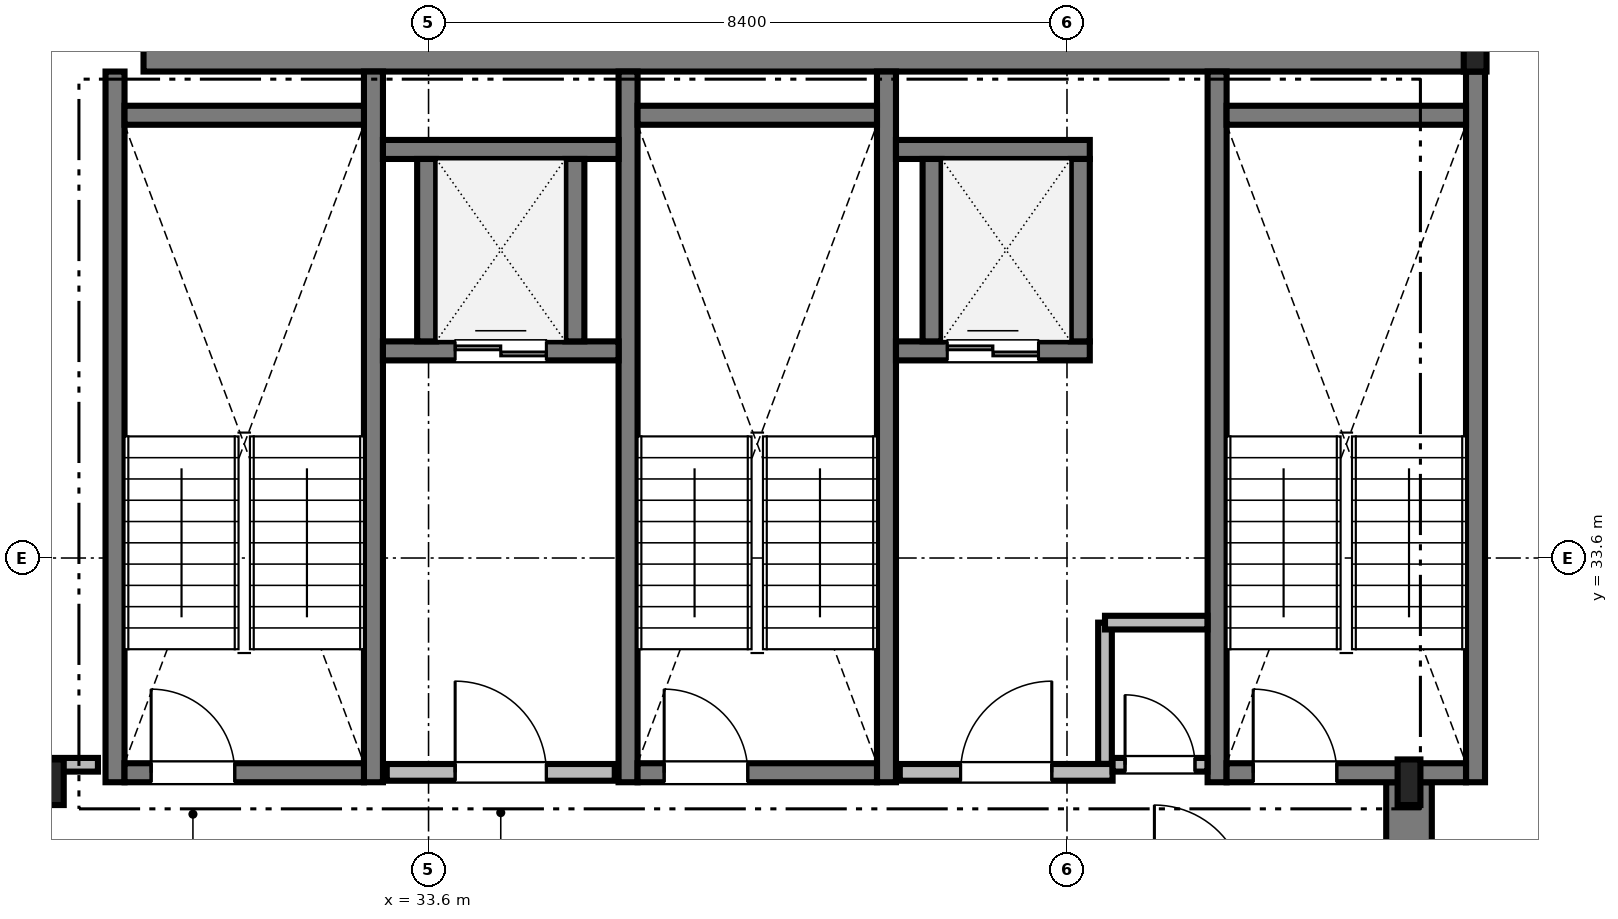
"""IFC4 building model, lengths in metres.
Left out: names, types, materials, properties, quantities, classifications, styles, units other than length and angle.
Written with IfcOpenShell. Run it as: python <this file> out.ifc"""

import sys

from ifc_helpers import new_model, si_unit, direction, frame, frame_2d, origin, origin_2d, place, context, subcontext, project, spatial, rectangle, i_section, extrude, source, transform, mapped, element, fill, save


model = new_model("IFC4")
c1 = context("Model", 3, precision=1e-05, world=origin(), true_north=direction((0.0, 1.0)))
c2 = subcontext(c1, "Body", "Model", "MODEL_VIEW")
j1 = project(units=[si_unit("LENGTHUNIT", "METRE"), si_unit("PLANEANGLEUNIT", "RADIAN")], contexts=[c1])
p1 = place(None, origin())
s1 = spatial("IfcSite", under=j1, at=p1, CompositionType="ELEMENT")
p2 = place(p1, origin())
s2 = spatial("IfcBuilding", under=s1, at=p2, CompositionType="ELEMENT")
p3 = place(p2, frame((0.0, 0.0, 266.4)))
s3 = spatial("IfcBuildingStorey", under=s2, at=p3, CompositionType="ELEMENT", Elevation=266.4)
m1 = source(origin(), c2, "Body", "SweptSolid", [
    extrude(rectangle(XDim=17.52, YDim=0.6, at=frame_2d((8.76, 0.0))), origin(), (0.0, 0.0, 1.0), 3.65),
])
p4 = place(p3, frame((29.85, 40.3, 0.0), z_axis=(0.0, 0.0, 1.0), x_axis=(1.0, 0.0, 0.0)))
e1 = element("IfcWall", 1, at=p4, inside=s3, PredefinedType="SHEAR", context=c2, shape_type="MappedRepresentation", body=[
    mapped(m1, transform((0.0, 0.0, 0.0), scale=1.0)),
])
m2 = source(origin(), c2, "Body", "SweptSolid", [
    extrude(rectangle(XDim=13.15, YDim=0.6, at=frame_2d((6.575, 0.0))), origin(), (0.0, 0.0, 1.0), 3.65),
])
p5 = place(p3, frame((46.5, 17.5, 0.0), z_axis=(0.0, 0.0, 1.0), x_axis=(0.0, 1.0, 0.0)))
e2 = element("IfcWall", 2, at=p5, inside=s3, PredefinedType="SHEAR", context=c2, shape_type="MappedRepresentation", body=[
    mapped(m2, transform((0.0, 0.0, 0.0), scale=1.0)),
])
m3 = source(origin(), c2, "Body", "SweptSolid", [
    extrude(i_section(OverallWidth=0.3, OverallDepth=0.6, WebThickness=0.015, FlangeThickness=0.03, FilletRadius=0.027, at=origin_2d()), origin(), (0.0, 0.0, 1.0), 3.65),
])
for number, where, z_axis, x_axis in (
    (3, (28.65, 30.65, 0.0), (0.0, 0.0, 1.0), (1.0, 0.0, 0.0)),
    (4, (46.5, 30.65, 0.0), (0.0, 0.0, 1.0), (1.0, 0.0, 0.0)),
    (5, (47.37, 40.3, 0.0), (0.0, 0.0, 1.0), (1.0, 0.0, 0.0)),
):
    element("IfcColumn", number, at=place(p3, frame(where, z_axis=z_axis, x_axis=x_axis)), inside=s3, PredefinedType="COLUMN", context=c2, shape_type="MappedRepresentation", body=[
        mapped(m3, transform((0.0, 0.0, 0.0), scale=1.0)),
    ])
m4 = source(origin(), c2, "Body", "SweptSolid", [
    extrude(rectangle(XDim=9.35, YDim=0.25, at=frame_2d((4.675, 0.0))), origin(), (0.0, 0.0, 1.0), 3.75),
])
for number, where, z_axis, x_axis in (
    (6, (29.475, 30.65, 0.0), (0.0, 0.0, 1.0), (0.0, 1.0, 0.0)),
    (7, (32.875, 30.65, 0.0), (0.0, 0.0, 1.0), (0.0, 1.0, 0.0)),
):
    element("IfcWall", number, at=place(p3, frame(where, z_axis=z_axis, x_axis=x_axis)), inside=s3, PredefinedType="SOLIDWALL", context=c2, shape_type="MappedRepresentation", body=[
        mapped(m4, transform((0.0, 0.0, 0.0), scale=1.0)),
    ])
m5 = source(origin(), c2, "Body", "SweptSolid", [
    extrude(rectangle(XDim=3.15, YDim=0.25, at=frame_2d((1.575, 0.0))), origin(), (0.0, 0.0, 1.0), 3.75),
])
p6 = place(p3, frame((29.6, 39.425, 0.0), z_axis=(0.0, 0.0, 1.0), x_axis=(1.0, 0.0, 0.0)))
e8 = element("IfcWall", 8, at=p6, inside=s3, PredefinedType="SOLIDWALL", context=c2, shape_type="MappedRepresentation", body=[
    mapped(m5, transform((0.0, 0.0, 0.0), scale=1.0)),
])
p7 = place(p3, frame((29.6, 30.775, 0.0), z_axis=(0.0, 0.0, 1.0), x_axis=(1.0, 0.0, 0.0)))
e9 = element("IfcWall", 9, at=p7, inside=s3, PredefinedType="SOLIDWALL", context=c2, shape_type="MappedRepresentation", body=[
    mapped(m5, transform((0.0, 0.0, 0.0), scale=1.0)),
])
m6 = source(origin(), c2, "Body", "SweptSolid", [
    extrude(rectangle(XDim=1.1, YDim=2.2, at=frame_2d((0.55, 1.1))), frame((0.0, 0.135, 0.0), z_axis=(0.0, -1.0, 0.0), x_axis=(1.0, 0.0, 0.0)), (0.0, 0.0, 1.0), 0.27),
])
p8 = place(p7, frame((0.35, 0.0, 0.0)))
e10 = element("IfcOpeningElement", 10, at=p8, cuts=e9, PredefinedType="OPENING", context=c2, shape_type="MappedRepresentation", body=[
    mapped(m6, transform((0.0, 0.0, 0.0), scale=1.0)),
])
for number, where, z_axis, x_axis in (
    (11, (36.225, 30.65, 0.0), (0.0, 0.0, 1.0), (0.0, 1.0, 0.0)),
    (12, (39.625, 30.65, 0.0), (0.0, 0.0, 1.0), (0.0, 1.0, 0.0)),
):
    element("IfcWall", number, at=place(p3, frame(where, z_axis=z_axis, x_axis=x_axis)), inside=s3, PredefinedType="SOLIDWALL", context=c2, shape_type="MappedRepresentation", body=[
        mapped(m4, transform((0.0, 0.0, 0.0), scale=1.0)),
    ])
p9 = place(p3, frame((36.35, 39.425, 0.0), z_axis=(0.0, 0.0, 1.0), x_axis=(1.0, 0.0, 0.0)))
e13 = element("IfcWall", 13, at=p9, inside=s3, PredefinedType="SOLIDWALL", context=c2, shape_type="MappedRepresentation", body=[
    mapped(m5, transform((0.0, 0.0, 0.0), scale=1.0)),
])
p10 = place(p3, frame((36.35, 30.775, 0.0), z_axis=(0.0, 0.0, 1.0), x_axis=(1.0, 0.0, 0.0)))
e14 = element("IfcWall", 14, at=p10, inside=s3, PredefinedType="SOLIDWALL", context=c2, shape_type="MappedRepresentation", body=[
    mapped(m5, transform((0.0, 0.0, 0.0), scale=1.0)),
])
p11 = place(p10, frame((0.35, 0.0, 0.0)))
e15 = element("IfcOpeningElement", 15, at=p11, cuts=e14, PredefinedType="OPENING", context=c2, shape_type="MappedRepresentation", body=[
    mapped(m6, transform((0.0, 0.0, 0.0), scale=1.0)),
])
for number, where, z_axis, x_axis in (
    (16, (43.975, 30.65, 0.0), (0.0, 0.0, 1.0), (0.0, 1.0, 0.0)),
    (17, (47.375, 30.65, 0.0), (0.0, 0.0, 1.0), (0.0, 1.0, 0.0)),
):
    element("IfcWall", number, at=place(p3, frame(where, z_axis=z_axis, x_axis=x_axis)), inside=s3, PredefinedType="SOLIDWALL", context=c2, shape_type="MappedRepresentation", body=[
        mapped(m4, transform((0.0, 0.0, 0.0), scale=1.0)),
    ])
p12 = place(p3, frame((44.1, 39.425, 0.0), z_axis=(0.0, 0.0, 1.0), x_axis=(1.0, 0.0, 0.0)))
e18 = element("IfcWall", 18, at=p12, inside=s3, PredefinedType="SOLIDWALL", context=c2, shape_type="MappedRepresentation", body=[
    mapped(m5, transform((0.0, 0.0, 0.0), scale=1.0)),
])
p13 = place(p3, frame((44.1, 30.775, 0.0), z_axis=(0.0, 0.0, 1.0), x_axis=(1.0, 0.0, 0.0)))
e19 = element("IfcWall", 19, at=p13, inside=s3, PredefinedType="SOLIDWALL", context=c2, shape_type="MappedRepresentation", body=[
    mapped(m5, transform((0.0, 0.0, 0.0), scale=1.0)),
])
p14 = place(p13, frame((0.35, 0.0, 0.0)))
e20 = element("IfcOpeningElement", 20, at=p14, cuts=e19, PredefinedType="OPENING", context=c2, shape_type="MappedRepresentation", body=[
    mapped(m6, transform((0.0, 0.0, 0.0), scale=1.0)),
])
m7 = source(origin(), c2, "Body", "SweptSolid", [
    extrude(rectangle(XDim=3.0, YDim=0.22, at=frame_2d((1.5, 0.0))), origin(), (0.0, 0.0, 1.0), 3.65),
])
p15 = place(p3, frame((33.05, 30.78, 0.0), z_axis=(0.0, 0.0, 1.0), x_axis=(1.0, 0.0, 0.0)))
e21 = element("IfcWall", 21, at=p15, inside=s3, PredefinedType="SOLIDWALL", context=c2, shape_type="MappedRepresentation", body=[
    mapped(m7, transform((0.0, 0.0, 0.0), scale=1.0)),
])
m8 = source(origin(), c2, "Body", "SweptSolid", [
    extrude(rectangle(XDim=1.2, YDim=2.2, at=frame_2d((0.6, 1.1))), frame((0.0, 0.12, 0.0), z_axis=(0.0, -1.0, 0.0), x_axis=(1.0, 0.0, 0.0)), (0.0, 0.0, 1.0), 0.24),
])
p16 = place(p15, frame((0.9, 0.0, 0.0)))
e22 = element("IfcOpeningElement", 22, at=p16, cuts=e21, PredefinedType="OPENING", context=c2, shape_type="MappedRepresentation", body=[
    mapped(m8, transform((0.0, 0.0, 0.0), scale=1.0)),
])
m9 = source(origin(), c2, "Body", "SweptSolid", [
    extrude(rectangle(XDim=2.8, YDim=0.22, at=frame_2d((1.4, 0.0))), origin(), (0.0, 0.0, 1.0), 3.65),
])
p17 = place(p3, frame((39.8, 30.78, 0.0), z_axis=(0.0, 0.0, 1.0), x_axis=(1.0, 0.0, 0.0)))
e23 = element("IfcWall", 23, at=p17, inside=s3, PredefinedType="SOLIDWALL", context=c2, shape_type="MappedRepresentation", body=[
    mapped(m9, transform((0.0, 0.0, 0.0), scale=1.0)),
])
p18 = place(p17, frame((0.8, 0.0, 0.0)))
e24 = element("IfcOpeningElement", 24, at=p18, cuts=e23, PredefinedType="OPENING", context=c2, shape_type="MappedRepresentation", body=[
    mapped(m8, transform((0.0, 0.0, 0.0), scale=1.0)),
])
m10 = source(origin(), c2, "Body", "SweptSolid", [
    extrude(rectangle(XDim=3.1, YDim=0.25, at=frame_2d((1.55, 0.0))), origin(), (0.0, 0.0, 1.0), 3.65),
])
p19 = place(p3, frame((33.0, 36.325, 0.0), z_axis=(0.0, 0.0, 1.0), x_axis=(1.0, 0.0, 0.0)))
e25 = element("IfcWall", 25, at=p19, inside=s3, PredefinedType="SOLIDWALL", context=c2, shape_type="MappedRepresentation", body=[
    mapped(m10, transform((0.0, 0.0, 0.0), scale=1.0)),
])
m11 = source(origin(), c2, "Body", "SweptSolid", [
    extrude(rectangle(XDim=1.2, YDim=2.25, at=frame_2d((0.6, 1.125))), frame((0.0, 0.135, 0.0), z_axis=(0.0, -1.0, 0.0), x_axis=(1.0, 0.0, 0.0)), (0.0, 0.0, 1.0), 0.27),
])
p20 = place(p19, frame((0.95, 0.0, 0.0)))
e26 = element("IfcOpeningElement", 26, at=p20, cuts=e25, PredefinedType="OPENING", context=c2, shape_type="MappedRepresentation", body=[
    mapped(m11, transform((0.0, 0.0, 0.0), scale=1.0)),
])
p21 = place(p3, frame((33.0, 38.975, 0.0), z_axis=(0.0, 0.0, 1.0), x_axis=(1.0, 0.0, 0.0)))
e27 = element("IfcWall", 27, at=p21, inside=s3, PredefinedType="SOLIDWALL", context=c2, shape_type="MappedRepresentation", body=[
    mapped(m10, transform((0.0, 0.0, 0.0), scale=1.0)),
])
m12 = source(origin(), c2, "Body", "SweptSolid", [
    extrude(rectangle(XDim=2.4, YDim=0.25, at=frame_2d((1.2, 0.0))), origin(), (0.0, 0.0, 1.0), 3.65),
])
for number, where, z_axis, x_axis in (
    (28, (33.575, 36.45, 0.0), (0.0, 0.0, 1.0), (0.0, 1.0, 0.0)),
    (29, (35.525, 36.45, 0.0), (0.0, 0.0, 1.0), (0.0, 1.0, 0.0)),
):
    element("IfcWall", number, at=place(p3, frame(where, z_axis=z_axis, x_axis=x_axis)), inside=s3, PredefinedType="SOLIDWALL", context=c2, shape_type="MappedRepresentation", body=[
        mapped(m12, transform((0.0, 0.0, 0.0), scale=1.0)),
    ])
m13 = source(origin(), c2, "Body", "SweptSolid", [
    extrude(rectangle(XDim=2.55, YDim=0.25, at=frame_2d((1.275, 0.0))), origin(), (0.0, 0.0, 1.0), 3.65),
])
p22 = place(p3, frame((39.75, 36.325, 0.0), z_axis=(0.0, 0.0, 1.0), x_axis=(1.0, 0.0, 0.0)))
e30 = element("IfcWall", 30, at=p22, inside=s3, PredefinedType="SOLIDWALL", context=c2, shape_type="MappedRepresentation", body=[
    mapped(m13, transform((0.0, 0.0, 0.0), scale=1.0)),
])
p23 = place(p22, frame((0.675, 0.0, 0.0)))
e31 = element("IfcOpeningElement", 31, at=p23, cuts=e30, PredefinedType="OPENING", context=c2, shape_type="MappedRepresentation", body=[
    mapped(m11, transform((0.0, 0.0, 0.0), scale=1.0)),
])
p24 = place(p3, frame((39.75, 38.975, 0.0), z_axis=(0.0, 0.0, 1.0), x_axis=(1.0, 0.0, 0.0)))
e32 = element("IfcWall", 32, at=p24, inside=s3, PredefinedType="SOLIDWALL", context=c2, shape_type="MappedRepresentation", body=[
    mapped(m13, transform((0.0, 0.0, 0.0), scale=1.0)),
])
for number, where, z_axis, x_axis in (
    (33, (40.225, 36.45, 0.0), (0.0, 0.0, 1.0), (0.0, 1.0, 0.0)),
    (34, (42.175, 36.45, 0.0), (0.0, 0.0, 1.0), (0.0, 1.0, 0.0)),
):
    element("IfcWall", number, at=place(p3, frame(where, z_axis=z_axis, x_axis=x_axis)), inside=s3, PredefinedType="SOLIDWALL", context=c2, shape_type="MappedRepresentation", body=[
        mapped(m12, transform((0.0, 0.0, 0.0), scale=1.0)),
    ])
m14 = source(origin(), c2, "Body", "SweptSolid", [
    extrude(rectangle(XDim=11.708, YDim=0.18, at=frame_2d((5.854, 0.0))), origin(), (0.0, 0.0, 1.0), 2.892),
])
p25 = place(p3, frame((17.542, 30.88, 0.0), z_axis=(0.0, 0.0, 1.0), x_axis=(1.0, 0.0, 0.0)))
e35 = element("IfcWall", 35, at=p25, inside=s3, PredefinedType="PARTITIONING", context=c2, shape_type="MappedRepresentation", body=[
    mapped(m14, transform((0.0, 0.0, 0.0), scale=1.0)),
])
m15 = source(origin(), c2, "Body", "SweptSolid", [
    extrude(rectangle(XDim=1.05, YDim=2.2, at=frame_2d((0.525, 1.1))), frame((0.0, 0.1, 0.0), z_axis=(0.0, -1.0, 0.0), x_axis=(1.0, 0.0, 0.0)), (0.0, 0.0, 1.0), 0.2),
])
p26 = place(p25, frame((4.658, 0.0, 0.0)))
e36 = element("IfcOpeningElement", 36, at=p26, cuts=e35, PredefinedType="OPENING", context=c2, shape_type="MappedRepresentation", body=[
    mapped(m15, transform((0.0, 0.0, 0.0), scale=1.0)),
])
m16 = source(origin(), c2, "Body", "SweptSolid", [
    extrude(rectangle(XDim=1.248, YDim=0.18, at=frame_2d((0.624, 0.0))), origin(), (0.0, 0.0, 1.0), 3.65),
])
p27 = place(p3, frame((42.6, 30.88, 0.0), z_axis=(0.0, 0.0, 1.0), x_axis=(1.0, 0.0, 0.0)))
e37 = element("IfcWall", 37, at=p27, inside=s3, PredefinedType="PARTITIONING", context=c2, shape_type="MappedRepresentation", body=[
    mapped(m16, transform((0.0, 0.0, 0.0), scale=1.0)),
])
m17 = source(origin(), c2, "Body", "SweptSolid", [
    extrude(rectangle(XDim=0.92, YDim=2.1, at=frame_2d((0.46, 1.05))), frame((0.0, 0.1, 0.0), z_axis=(0.0, -1.0, 0.0), x_axis=(1.0, 0.0, 0.0)), (0.0, 0.0, 1.0), 0.2),
])
p28 = place(p27, frame((0.164, 0.0, 0.0)))
e38 = element("IfcOpeningElement", 38, at=p28, cuts=e37, PredefinedType="OPENING", context=c2, shape_type="MappedRepresentation", body=[
    mapped(m17, transform((0.0, 0.0, 0.0), scale=1.0)),
])
m18 = source(origin(), c2, "Body", "SweptSolid", [
    extrude(rectangle(XDim=1.858, YDim=0.18, at=frame_2d((0.929, 0.0))), origin(), (0.0, 0.0, 1.0), 3.65),
])
p29 = place(p3, frame((42.5, 30.892, 0.0), z_axis=(0.0, 0.0, 1.0), x_axis=(0.0, 1.0, 0.0)))
e39 = element("IfcWall", 39, at=p29, inside=s3, PredefinedType="PARTITIONING", context=c2, shape_type="MappedRepresentation", body=[
    mapped(m18, transform((0.0, 0.0, 0.0), scale=1.0)),
])
m19 = source(origin(), c2, "Body", "SweptSolid", [
    extrude(rectangle(XDim=1.348, YDim=0.18, at=frame_2d((0.674, 0.0))), origin(), (0.0, 0.0, 1.0), 3.65),
])
p30 = place(p3, frame((42.5, 32.75, 0.0), z_axis=(0.0, 0.0, 1.0), x_axis=(1.0, 0.0, 0.0)))
e40 = element("IfcWall", 40, at=p30, inside=s3, PredefinedType="PARTITIONING", context=c2, shape_type="MappedRepresentation", body=[
    mapped(m19, transform((0.0, 0.0, 0.0), scale=1.0)),
])
m20 = source(origin(), c2, "Body", "SweptSolid", [
    extrude(rectangle(XDim=1.1, YDim=2.2, at=frame_2d((0.55, 1.1))), frame((0.0, 0.025, 0.0), z_axis=(0.0, -1.0, 0.0), x_axis=(1.0, 0.0, 0.0)), (0.0, 0.0, 1.0), 0.05),
])
p31 = place(p8, origin())
e41 = element("IfcDoor", 41, at=p31, inside=s3, OperationType="SINGLE_SWING_LEFT", PredefinedType="DOOR", context=c2, shape_type="MappedRepresentation", body=[
    mapped(m20, transform((0.0, 0.0, 0.0), scale=1.0)),
])
fill(e10, e41)
p32 = place(p11, origin())
e42 = element("IfcDoor", 42, at=p32, inside=s3, OperationType="SINGLE_SWING_LEFT", PredefinedType="DOOR", context=c2, shape_type="MappedRepresentation", body=[
    mapped(m20, transform((0.0, 0.0, 0.0), scale=1.0)),
])
fill(e15, e42)
p33 = place(p14, origin())
e43 = element("IfcDoor", 43, at=p33, inside=s3, OperationType="SINGLE_SWING_LEFT", PredefinedType="DOOR", context=c2, shape_type="MappedRepresentation", body=[
    mapped(m20, transform((0.0, 0.0, 0.0), scale=1.0)),
])
fill(e20, e43)
m21 = source(origin(), c2, "Body", "SweptSolid", [
    extrude(rectangle(XDim=1.2, YDim=2.2, at=frame_2d((0.6, 1.1))), frame((0.0, 0.025, 0.0), z_axis=(0.0, -1.0, 0.0), x_axis=(1.0, 0.0, 0.0)), (0.0, 0.0, 1.0), 0.05),
])
p34 = place(p16, origin())
e44 = element("IfcDoor", 44, at=p34, inside=s3, OperationType="SINGLE_SWING_LEFT", PredefinedType="DOOR", context=c2, shape_type="MappedRepresentation", body=[
    mapped(m21, transform((0.0, 0.0, 0.0), scale=1.0)),
])
fill(e22, e44)
p35 = place(p18, origin())
e45 = element("IfcDoor", 45, at=p35, inside=s3, OperationType="SINGLE_SWING_RIGHT", PredefinedType="DOOR", context=c2, shape_type="MappedRepresentation", body=[
    mapped(m21, transform((0.0, 0.0, 0.0), scale=1.0)),
])
fill(e24, e45)
m22 = source(origin(), c2, "Body", "SweptSolid", [
    extrude(rectangle(XDim=1.2, YDim=2.25, at=frame_2d((0.6, 1.125))), frame((0.0, 0.025, 0.0), z_axis=(0.0, -1.0, 0.0), x_axis=(1.0, 0.0, 0.0)), (0.0, 0.0, 1.0), 0.05),
])
p36 = place(p20, origin())
e46 = element("IfcDoor", 46, at=p36, inside=s3, OperationType="DOUBLE_DOOR_SLIDING", PredefinedType="DOOR", context=c2, shape_type="MappedRepresentation", body=[
    mapped(m22, transform((0.0, 0.0, 0.0), scale=1.0)),
])
fill(e26, e46)
p37 = place(p23, origin())
e47 = element("IfcDoor", 47, at=p37, inside=s3, OperationType="DOUBLE_DOOR_SLIDING", PredefinedType="DOOR", context=c2, shape_type="MappedRepresentation", body=[
    mapped(m22, transform((0.0, 0.0, 0.0), scale=1.0)),
])
fill(e31, e47)
m23 = source(origin(), c2, "Body", "SweptSolid", [
    extrude(rectangle(XDim=0.92, YDim=2.1, at=frame_2d((0.46, 1.05))), frame((0.0, 0.025, 0.0), z_axis=(0.0, -1.0, 0.0), x_axis=(1.0, 0.0, 0.0)), (0.0, 0.0, 1.0), 0.05),
])
p38 = place(p28, origin())
e48 = element("IfcDoor", 48, at=p38, inside=s3, OperationType="SINGLE_SWING_LEFT", PredefinedType="DOOR", context=c2, shape_type="MappedRepresentation", body=[
    mapped(m23, transform((0.0, 0.0, 0.0), scale=1.0)),
])
fill(e38, e48)
save(model, sys.argv[1])
